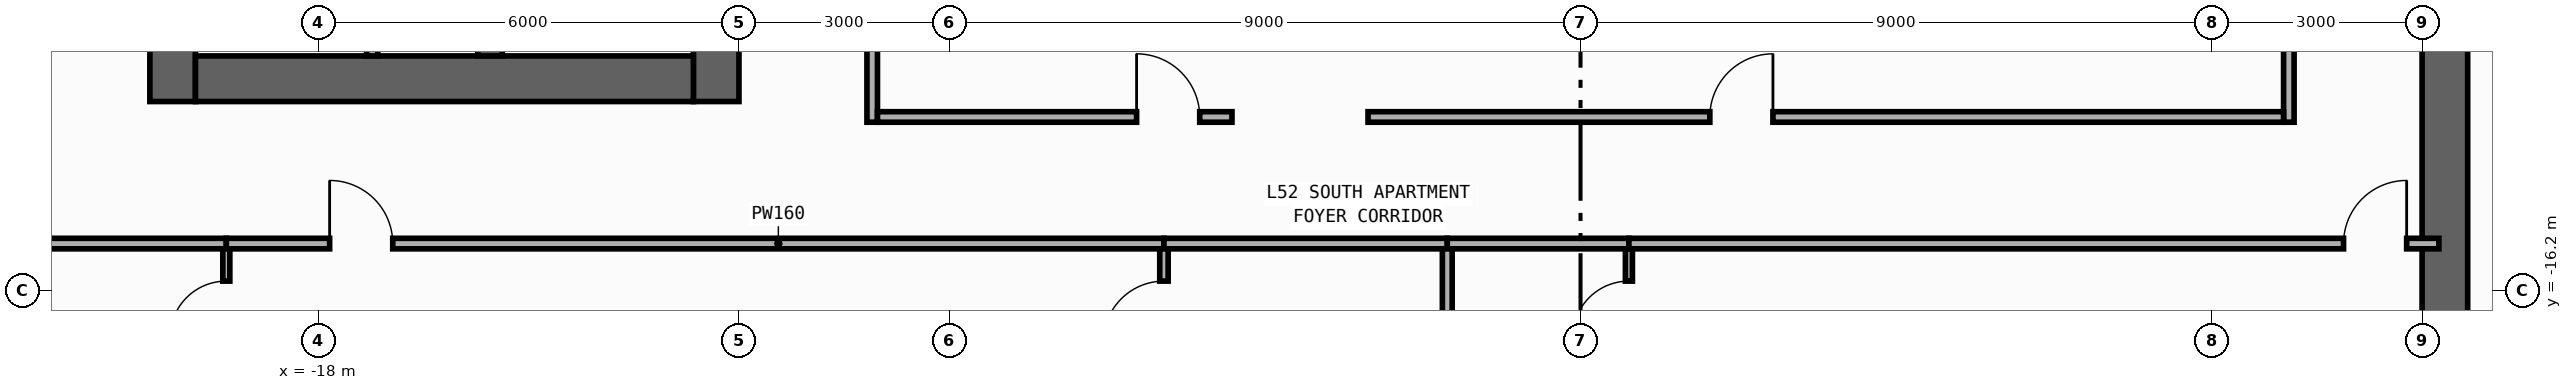
"""IFC4 building model, lengths in metres.
Left out: names, types, materials, properties, quantities, classifications, styles, units other than length and angle.
Written with IfcOpenShell. Run it as: python <this file> out.ifc"""

import sys

from ifc_helpers import new_model, si_unit, direction, frame, frame_2d, origin, place, context, subcontext, project, spatial, rectangle, extrude, element, fill, save


model = new_model("IFC4")
c1 = context("Model", 3, precision=1e-05, world=origin(), true_north=direction((0.0, 1.0)))
c2 = subcontext(c1, "Body", "Model", "MODEL_VIEW")
j1 = project(units=[si_unit("LENGTHUNIT", "METRE"), si_unit("PLANEANGLEUNIT", "RADIAN")], contexts=[c1])
p1 = place(None, origin())
s1 = spatial("IfcSite", under=j1, at=p1, CompositionType="ELEMENT")
p2 = place(p1, origin())
s2 = spatial("IfcBuilding", under=s1, at=p2, CompositionType="ELEMENT")
p3 = place(p2, frame((0.0, 0.0, 226.0)))
s3 = spatial("IfcBuildingStorey", under=s2, at=p3, CompositionType="ELEMENT", Elevation=226.0)
p4 = place(p3, frame((-20.075, -13.5, 0.0), z_axis=(0.0, 0.0, 1.0), x_axis=(0.0, 1.0, 0.0)))
e1 = element("IfcWall", 1, at=p4, inside=s3, PredefinedType="SHEAR", context=c2, shape_type="SweptSolid", body=[
    extrude(rectangle(XDim=27.0, YDim=0.65, at=frame_2d((13.5, 0.0))), origin(), (0.0, 0.0, 1.0), 3.34),
])
p5 = place(p3, frame((-12.325, -13.5, 0.0), z_axis=(0.0, 0.0, 1.0), x_axis=(0.0, 1.0, 0.0)))
e2 = element("IfcWall", 2, at=p5, inside=s3, PredefinedType="SHEAR", context=c2, shape_type="SweptSolid", body=[
    extrude(rectangle(XDim=27.0, YDim=0.65, at=frame_2d((13.5, 0.0))), origin(), (0.0, 0.0, 1.0), 3.34),
])
p6 = place(p5, frame((15.175, 0.0, 0.0)))
e3 = element("IfcOpeningElement", 3, at=p6, cuts=e2, PredefinedType="OPENING", context=c2, shape_type="SweptSolid", body=[
    extrude(rectangle(XDim=0.85, YDim=2.1, at=frame_2d((0.425, 1.05))), frame((0.0, 0.335, 0.0), z_axis=(0.0, -1.0, 0.0), x_axis=(1.0, 0.0, 0.0)), (0.0, 0.0, 1.0), 0.67),
])
p7 = place(p5, frame((21.275, 0.0, 0.0)))
e4 = element("IfcOpeningElement", 4, at=p7, cuts=e2, PredefinedType="OPENING", context=c2, shape_type="SweptSolid", body=[
    extrude(rectangle(XDim=0.85, YDim=2.1, at=frame_2d((0.425, 1.05))), frame((0.0, 0.335, 0.0), z_axis=(0.0, -1.0, 0.0), x_axis=(1.0, 0.0, 0.0)), (0.0, 0.0, 1.0), 0.67),
])
p8 = place(p5, frame((4.275, 0.0, 0.0)))
e5 = element("IfcOpeningElement", 5, at=p8, cuts=e2, PredefinedType="OPENING", context=c2, shape_type="SweptSolid", body=[
    extrude(rectangle(XDim=0.85, YDim=2.1, at=frame_2d((0.425, 1.05))), frame((0.0, 0.335, 0.0), z_axis=(0.0, -1.0, 0.0), x_axis=(1.0, 0.0, 0.0)), (0.0, 0.0, 1.0), 0.67),
])
p9 = place(p5, frame((10.275, 0.0, 0.0)))
e6 = element("IfcOpeningElement", 6, at=p9, cuts=e2, PredefinedType="OPENING", context=c2, shape_type="SweptSolid", body=[
    extrude(rectangle(XDim=0.85, YDim=2.1, at=frame_2d((0.425, 1.05))), frame((0.0, 0.335, 0.0), z_axis=(0.0, -1.0, 0.0), x_axis=(1.0, 0.0, 0.0)), (0.0, 0.0, 1.0), 0.67),
])
p10 = place(p5, frame((12.725, 0.0, 0.0)))
e7 = element("IfcOpeningElement", 7, at=p10, cuts=e2, PredefinedType="OPENING", context=c2, shape_type="SweptSolid", body=[
    extrude(rectangle(XDim=1.15, YDim=2.2, at=frame_2d((0.575, 1.1))), frame((0.0, 0.335, 0.0), z_axis=(0.0, -1.0, 0.0), x_axis=(1.0, 0.0, 0.0)), (0.0, 0.0, 1.0), 0.67),
])
p11 = place(p5, frame((1.625, 0.0, 0.0)))
e8 = element("IfcOpeningElement", 8, at=p11, cuts=e2, PredefinedType="OPENING", context=c2, shape_type="SweptSolid", body=[
    extrude(rectangle(XDim=0.85, YDim=2.1, at=frame_2d((0.425, 1.05))), frame((0.0, 0.335, 0.0), z_axis=(0.0, -1.0, 0.0), x_axis=(1.0, 0.0, 0.0)), (0.0, 0.0, 1.0), 0.67),
])
p12 = place(p3, frame((-19.75, -13.175, 0.0), z_axis=(0.0, 0.0, 1.0), x_axis=(1.0, 0.0, 0.0)))
e9 = element("IfcWall", 9, at=p12, inside=s3, PredefinedType="SHEAR", context=c2, shape_type="SweptSolid", body=[
    extrude(rectangle(XDim=7.1, YDim=0.65, at=frame_2d((3.55, 0.0))), origin(), (0.0, 0.0, 1.0), 3.34),
])
p13 = place(p3, frame((-15.55, -12.85, 0.0), z_axis=(0.0, 0.0, 1.0), x_axis=(0.0, 1.0, 0.0)))
e10 = element("IfcWall", 10, at=p13, inside=s3, PredefinedType="SHEAR", context=c2, shape_type="SweptSolid", body=[
    extrude(rectangle(XDim=25.7, YDim=0.35, at=frame_2d((12.85, 0.0))), origin(), (0.0, 0.0, 1.0), 3.34),
])
p14 = place(p13, frame((12.075, 0.0, 0.0)))
e11 = element("IfcOpeningElement", 11, at=p14, cuts=e10, PredefinedType="OPENING", context=c2, shape_type="SweptSolid", body=[
    extrude(rectangle(XDim=1.15, YDim=2.2, at=frame_2d((0.575, 1.1))), frame((0.0, 0.185, 0.0), z_axis=(0.0, -1.0, 0.0), x_axis=(1.0, 0.0, 0.0)), (0.0, 0.0, 1.0), 0.37),
])
p15 = place(p13, frame((0.975, 0.0, 0.0)))
e12 = element("IfcOpeningElement", 12, at=p15, cuts=e10, PredefinedType="OPENING", context=c2, shape_type="SweptSolid", body=[
    extrude(rectangle(XDim=0.85, YDim=2.1, at=frame_2d((0.425, 1.05))), frame((0.0, 0.185, 0.0), z_axis=(0.0, -1.0, 0.0), x_axis=(1.0, 0.0, 0.0)), (0.0, 0.0, 1.0), 0.37),
])
p16 = place(p3, frame((12.325, -19.8, 0.0), z_axis=(0.0, 0.0, 1.0), x_axis=(0.0, 1.0, 0.0)))
e13 = element("IfcWall", 13, at=p16, inside=s3, PredefinedType="SHEAR", context=c2, shape_type="SweptSolid", body=[
    extrude(rectangle(XDim=27.0, YDim=0.65, at=frame_2d((13.5, 0.0))), origin(), (0.0, 0.0, 1.0), 3.34),
])
p17 = place(p16, frame((23.05, 0.0, 0.0)))
e14 = element("IfcOpeningElement", 14, at=p17, cuts=e13, PredefinedType="OPENING", context=c2, shape_type="SweptSolid", body=[
    extrude(rectangle(XDim=1.1, YDim=2.2, at=frame_2d((0.55, 1.1))), frame((0.0, 0.335, 0.0), z_axis=(0.0, -1.0, 0.0), x_axis=(1.0, 0.0, 0.0)), (0.0, 0.0, 1.0), 0.67),
])
p18 = place(p16, frame((19.85, 0.0, 0.0)))
e15 = element("IfcOpeningElement", 15, at=p18, cuts=e13, PredefinedType="OPENING", context=c2, shape_type="SweptSolid", body=[
    extrude(rectangle(XDim=1.1, YDim=2.2, at=frame_2d((0.55, 1.1))), frame((0.0, 0.335, 0.0), z_axis=(0.0, -1.0, 0.0), x_axis=(1.0, 0.0, 0.0)), (0.0, 0.0, 1.0), 0.67),
])
p19 = place(p16, frame((16.65, 0.0, 0.0)))
e16 = element("IfcOpeningElement", 16, at=p19, cuts=e13, PredefinedType="OPENING", context=c2, shape_type="SweptSolid", body=[
    extrude(rectangle(XDim=1.1, YDim=2.2, at=frame_2d((0.55, 1.1))), frame((0.0, 0.335, 0.0), z_axis=(0.0, -1.0, 0.0), x_axis=(1.0, 0.0, 0.0)), (0.0, 0.0, 1.0), 0.67),
])
p20 = place(p16, frame((7.175, 0.0, 0.0)))
e17 = element("IfcOpeningElement", 17, at=p20, cuts=e13, PredefinedType="OPENING", context=c2, shape_type="SweptSolid", body=[
    extrude(rectangle(XDim=0.85, YDim=2.1, at=frame_2d((0.425, 1.05))), frame((0.0, 0.335, 0.0), z_axis=(0.0, -1.0, 0.0), x_axis=(1.0, 0.0, 0.0)), (0.0, 0.0, 1.0), 0.67),
])
p21 = place(p16, frame((10.375, 0.0, 0.0)))
e18 = element("IfcOpeningElement", 18, at=p21, cuts=e13, PredefinedType="OPENING", context=c2, shape_type="SweptSolid", body=[
    extrude(rectangle(XDim=0.85, YDim=2.1, at=frame_2d((0.425, 1.05))), frame((0.0, 0.335, 0.0), z_axis=(0.0, -1.0, 0.0), x_axis=(1.0, 0.0, 0.0)), (0.0, 0.0, 1.0), 0.67),
])
p22 = place(p16, frame((12.725, 0.0, 0.0)))
e19 = element("IfcOpeningElement", 19, at=p22, cuts=e13, PredefinedType="OPENING", context=c2, shape_type="SweptSolid", body=[
    extrude(rectangle(XDim=1.15, YDim=2.2, at=frame_2d((0.575, 1.1))), frame((0.0, 0.335, 0.0), z_axis=(0.0, -1.0, 0.0), x_axis=(1.0, 0.0, 0.0)), (0.0, 0.0, 1.0), 0.67),
])
p23 = place(p16, frame((25.125, 0.0, 0.0)))
e20 = element("IfcOpeningElement", 20, at=p23, cuts=e13, PredefinedType="OPENING", context=c2, shape_type="SweptSolid", body=[
    extrude(rectangle(XDim=0.85, YDim=2.1, at=frame_2d((0.425, 1.05))), frame((0.0, 0.335, 0.0), z_axis=(0.0, -1.0, 0.0), x_axis=(1.0, 0.0, 0.0)), (0.0, 0.0, 1.0), 0.67),
])
p24 = place(p3, frame((-17.23, -12.85, 0.0), z_axis=(0.0, 0.0, 1.0), x_axis=(0.0, 1.0, 0.0)))
e21 = element("IfcWall", 21, at=p24, inside=s3, PredefinedType="PARTITIONING", context=c2, shape_type="SweptSolid", body=[
    extrude(rectangle(XDim=2.38, YDim=0.16, at=frame_2d((1.19, 0.0))), origin(), (0.0, 0.0, 1.0), 3.34),
])
p25 = place(p24, frame((0.46, 0.0, 0.0)))
e22 = element("IfcOpeningElement", 22, at=p25, cuts=e21, PredefinedType="OPENING", context=c2, shape_type="SweptSolid", body=[
    extrude(rectangle(XDim=0.85, YDim=2.1, at=frame_2d((0.425, 1.05))), frame((0.0, 0.09, 0.0), z_axis=(0.0, -1.0, 0.0), x_axis=(1.0, 0.0, 0.0)), (0.0, 0.0, 1.0), 0.18),
])
p26 = place(p3, frame((-10.1, -13.795, 0.0), z_axis=(0.0, 0.0, 1.0), x_axis=(0.0, 1.0, 0.0)))
e23 = element("IfcWall", 23, at=p26, inside=s3, PredefinedType="PARTITIONING", context=c2, shape_type="SweptSolid", body=[
    extrude(rectangle(XDim=9.005, YDim=0.15, at=frame_2d((4.502, 0.0))), origin(), (0.0, 0.0, 1.0), 3.34),
])
p27 = place(p26, frame((7.645, 0.0, 0.0)))
e24 = element("IfcOpeningElement", 24, at=p27, cuts=e23, PredefinedType="OPENING", context=c2, shape_type="SweptSolid", body=[
    extrude(rectangle(XDim=0.9, YDim=2.15, at=frame_2d((0.45, 1.075))), frame((0.0, 0.085, 0.0), z_axis=(0.0, -1.0, 0.0), x_axis=(1.0, 0.0, 0.0)), (0.0, 0.0, 1.0), 0.17),
])
p28 = place(p3, frame((10.1, -13.795, 0.0), z_axis=(0.0, 0.0, 1.0), x_axis=(0.0, 1.0, 0.0)))
e25 = element("IfcWall", 25, at=p28, inside=s3, PredefinedType="PARTITIONING", context=c2, shape_type="SweptSolid", body=[
    extrude(rectangle(XDim=6.375, YDim=0.15, at=frame_2d((3.188, 0.0))), origin(), (0.0, 0.0, 1.0), 3.34),
])
p29 = place(p28, frame((5.015, 0.0, 0.0)))
e26 = element("IfcOpeningElement", 26, at=p29, cuts=e25, PredefinedType="OPENING", context=c2, shape_type="SweptSolid", body=[
    extrude(rectangle(XDim=0.9, YDim=2.15, at=frame_2d((0.45, 1.075))), frame((0.0, 0.085, 0.0), z_axis=(0.0, -1.0, 0.0), x_axis=(1.0, 0.0, 0.0)), (0.0, 0.0, 1.0), 0.17),
])
p30 = place(p3, frame((-21.955, -15.525, 0.0), z_axis=(0.0, 0.0, 1.0), x_axis=(1.0, 0.0, 0.0)))
e27 = element("IfcWall", 27, at=p30, inside=s3, PredefinedType="PARTITIONING", context=c2, shape_type="SweptSolid", body=[
    extrude(rectangle(XDim=2.645, YDim=0.15, at=frame_2d((1.323, 0.0))), origin(), (0.0, 0.0, 1.0), 3.34),
])
p31 = place(p3, frame((-19.31, -15.525, 0.0), z_axis=(0.0, 0.0, 1.0), x_axis=(1.0, 0.0, 0.0)))
e28 = element("IfcWall", 28, at=p31, inside=s3, PredefinedType="PARTITIONING", context=c2, shape_type="SweptSolid", body=[
    extrude(rectangle(XDim=13.37, YDim=0.15, at=frame_2d((6.685, 0.0))), origin(), (0.0, 0.0, 1.0), 3.34),
])
p32 = place(p31, frame((1.473, 0.0, 0.0)))
e29 = element("IfcOpeningElement", 29, at=p32, cuts=e28, PredefinedType="OPENING", context=c2, shape_type="SweptSolid", body=[
    extrude(rectangle(XDim=0.9, YDim=2.15, at=frame_2d((0.45, 1.075))), frame((0.0, 0.085, 0.0), z_axis=(0.0, -1.0, 0.0), x_axis=(1.0, 0.0, 0.0)), (0.0, 0.0, 1.0), 0.17),
])
p33 = place(p3, frame((-5.94, -15.525, 0.0), z_axis=(0.0, 0.0, 1.0), x_axis=(1.0, 0.0, 0.0)))
e30 = element("IfcWall", 30, at=p33, inside=s3, PredefinedType="PARTITIONING", context=c2, shape_type="SweptSolid", body=[
    extrude(rectangle(XDim=4.04, YDim=0.15, at=frame_2d((2.02, 0.0))), origin(), (0.0, 0.0, 1.0), 3.34),
])
p34 = place(p3, frame((-1.9, -15.525, 0.0), z_axis=(0.0, 0.0, 1.0), x_axis=(1.0, 0.0, 0.0)))
e31 = element("IfcWall", 31, at=p34, inside=s3, PredefinedType="PARTITIONING", context=c2, shape_type="SweptSolid", body=[
    extrude(rectangle(XDim=2.59, YDim=0.15, at=frame_2d((1.295, 0.0))), origin(), (0.0, 0.0, 1.0), 3.34),
])
p35 = place(p3, frame((0.69, -15.525, 0.0), z_axis=(0.0, 0.0, 1.0), x_axis=(1.0, 0.0, 0.0)))
e32 = element("IfcWall", 32, at=p35, inside=s3, PredefinedType="PARTITIONING", context=c2, shape_type="SweptSolid", body=[
    extrude(rectangle(XDim=11.55, YDim=0.15, at=frame_2d((5.775, 0.0))), origin(), (0.0, 0.0, 1.0), 3.34),
])
p36 = place(p35, frame((10.19, 0.0, 0.0)))
e33 = element("IfcOpeningElement", 33, at=p36, cuts=e32, PredefinedType="OPENING", context=c2, shape_type="SweptSolid", body=[
    extrude(rectangle(XDim=0.9, YDim=2.15, at=frame_2d((0.45, 1.075))), frame((0.0, 0.085, 0.0), z_axis=(0.0, -1.0, 0.0), x_axis=(1.0, 0.0, 0.0)), (0.0, 0.0, 1.0), 0.17),
])
p37 = place(p3, frame((-10.025, -13.72, 0.0), z_axis=(0.0, 0.0, 1.0), x_axis=(1.0, 0.0, 0.0)))
e34 = element("IfcWall", 34, at=p37, inside=s3, PredefinedType="PARTITIONING", context=c2, shape_type="SweptSolid", body=[
    extrude(rectangle(XDim=5.055, YDim=0.15, at=frame_2d((2.527, 0.0))), origin(), (0.0, 0.0, 1.0), 3.34),
])
p38 = place(p37, frame((3.695, 0.0, 0.0)))
e35 = element("IfcOpeningElement", 35, at=p38, cuts=e34, PredefinedType="OPENING", context=c2, shape_type="SweptSolid", body=[
    extrude(rectangle(XDim=0.9, YDim=2.15, at=frame_2d((0.45, 1.075))), frame((0.0, 0.085, 0.0), z_axis=(0.0, -1.0, 0.0), x_axis=(1.0, 0.0, 0.0)), (0.0, 0.0, 1.0), 0.17),
])
p39 = place(p3, frame((-3.03, -13.72, 0.0), z_axis=(0.0, 0.0, 1.0), x_axis=(1.0, 0.0, 0.0)))
e36 = element("IfcWall", 36, at=p39, inside=s3, PredefinedType="PARTITIONING", context=c2, shape_type="SweptSolid", body=[
    extrude(rectangle(XDim=13.055, YDim=0.15, at=frame_2d((6.527, 0.0))), origin(), (0.0, 0.0, 1.0), 3.34),
])
p40 = place(p39, frame((4.874, 0.0, 0.0)))
e37 = element("IfcOpeningElement", 37, at=p40, cuts=e36, PredefinedType="OPENING", context=c2, shape_type="SweptSolid", body=[
    extrude(rectangle(XDim=0.9, YDim=2.15, at=frame_2d((0.45, 1.075))), frame((0.0, 0.085, 0.0), z_axis=(0.0, -1.0, 0.0), x_axis=(1.0, 0.0, 0.0)), (0.0, 0.0, 1.0), 0.17),
])
p41 = place(p3, frame((-19.31, -18.1, 0.0), z_axis=(0.0, 0.0, 1.0), x_axis=(0.0, 1.0, 0.0)))
e38 = element("IfcWall", 38, at=p41, inside=s3, PredefinedType="PARTITIONING", context=c2, shape_type="SweptSolid", body=[
    extrude(rectangle(XDim=2.5, YDim=0.1, at=frame_2d((1.25, 0.0))), origin(), (0.0, 0.0, 1.0), 3.34),
])
p42 = place(p41, frame((1.24, 0.0, 0.0)))
e39 = element("IfcOpeningElement", 39, at=p42, cuts=e38, PredefinedType="OPENING", context=c2, shape_type="SweptSolid", body=[
    extrude(rectangle(XDim=0.8, YDim=2.1, at=frame_2d((0.4, 1.05))), frame((0.0, 0.06, 0.0), z_axis=(0.0, -1.0, 0.0), x_axis=(1.0, 0.0, 0.0)), (0.0, 0.0, 1.0), 0.12),
])
p43 = place(p3, frame((-5.94, -20.1, 0.0), z_axis=(0.0, 0.0, 1.0), x_axis=(0.0, 1.0, 0.0)))
e40 = element("IfcWall", 40, at=p43, inside=s3, PredefinedType="PARTITIONING", context=c2, shape_type="SweptSolid", body=[
    extrude(rectangle(XDim=4.5, YDim=0.12, at=frame_2d((2.25, 0.0))), origin(), (0.0, 0.0, 1.0), 3.34),
])
p44 = place(p43, frame((3.18, 0.0, 0.0)))
e41 = element("IfcOpeningElement", 41, at=p44, cuts=e40, PredefinedType="OPENING", context=c2, shape_type="SweptSolid", body=[
    extrude(rectangle(XDim=0.86, YDim=2.15, at=frame_2d((0.43, 1.075))), frame((0.0, 0.07, 0.0), z_axis=(0.0, -1.0, 0.0), x_axis=(1.0, 0.0, 0.0)), (0.0, 0.0, 1.0), 0.14),
])
p45 = place(p3, frame((-1.9, -18.1, 0.0), z_axis=(0.0, 0.0, 1.0), x_axis=(0.0, 1.0, 0.0)))
e42 = element("IfcWall", 42, at=p45, inside=s3, PredefinedType="PARTITIONING", context=c2, shape_type="SweptSolid", body=[
    extrude(rectangle(XDim=2.5, YDim=0.14, at=frame_2d((1.25, 0.0))), origin(), (0.0, 0.0, 1.0), 3.34),
])
p46 = place(p3, frame((0.69, -18.1, 0.0), z_axis=(0.0, 0.0, 1.0), x_axis=(0.0, 1.0, 0.0)))
e43 = element("IfcWall", 43, at=p46, inside=s3, PredefinedType="PARTITIONING", context=c2, shape_type="SweptSolid", body=[
    extrude(rectangle(XDim=2.5, YDim=0.1, at=frame_2d((1.25, 0.0))), origin(), (0.0, 0.0, 1.0), 3.34),
])
p47 = place(p46, frame((1.24, 0.0, 0.0)))
e44 = element("IfcOpeningElement", 44, at=p47, cuts=e43, PredefinedType="OPENING", context=c2, shape_type="SweptSolid", body=[
    extrude(rectangle(XDim=0.8, YDim=2.1, at=frame_2d((0.4, 1.05))), frame((0.0, 0.06, 0.0), z_axis=(0.0, -1.0, 0.0), x_axis=(1.0, 0.0, 0.0)), (0.0, 0.0, 1.0), 0.12),
])
p48 = place(p32, origin())
e45 = element("IfcDoor", 45, at=p48, inside=s3, OperationType="SINGLE_SWING_LEFT", PredefinedType="DOOR", context=c2, shape_type="SweptSolid", body=[
    extrude(rectangle(XDim=0.9, YDim=2.15, at=frame_2d((0.45, 1.075))), frame((0.0, 0.025, 0.0), z_axis=(0.0, -1.0, 0.0), x_axis=(1.0, 0.0, 0.0)), (0.0, 0.0, 1.0), 0.05),
])
fill(e29, e45)
p49 = place(p36, origin())
e46 = element("IfcDoor", 46, at=p49, inside=s3, OperationType="SINGLE_SWING_RIGHT", PredefinedType="DOOR", context=c2, shape_type="SweptSolid", body=[
    extrude(rectangle(XDim=0.9, YDim=2.15, at=frame_2d((0.45, 1.075))), frame((0.0, 0.025, 0.0), z_axis=(0.0, -1.0, 0.0), x_axis=(1.0, 0.0, 0.0)), (0.0, 0.0, 1.0), 0.05),
])
fill(e33, e46)
p50 = place(p38, origin())
e47 = element("IfcDoor", 47, at=p50, inside=s3, OperationType="SINGLE_SWING_LEFT", PredefinedType="DOOR", context=c2, shape_type="SweptSolid", body=[
    extrude(rectangle(XDim=0.9, YDim=2.15, at=frame_2d((0.45, 1.075))), frame((0.0, 0.025, 0.0), z_axis=(0.0, -1.0, 0.0), x_axis=(1.0, 0.0, 0.0)), (0.0, 0.0, 1.0), 0.05),
])
fill(e35, e47)
p51 = place(p40, origin())
e48 = element("IfcDoor", 48, at=p51, inside=s3, OperationType="SINGLE_SWING_RIGHT", PredefinedType="DOOR", context=c2, shape_type="SweptSolid", body=[
    extrude(rectangle(XDim=0.9, YDim=2.15, at=frame_2d((0.45, 1.075))), frame((0.0, 0.025, 0.0), z_axis=(0.0, -1.0, 0.0), x_axis=(1.0, 0.0, 0.0)), (0.0, 0.0, 1.0), 0.05),
])
fill(e37, e48)
p52 = place(p42, origin())
e49 = element("IfcDoor", 49, at=p52, inside=s3, OperationType="SINGLE_SWING_LEFT", PredefinedType="DOOR", context=c2, shape_type="SweptSolid", body=[
    extrude(rectangle(XDim=0.8, YDim=2.1, at=frame_2d((0.4, 1.05))), frame((0.0, 0.025, 0.0), z_axis=(0.0, -1.0, 0.0), x_axis=(1.0, 0.0, 0.0)), (0.0, 0.0, 1.0), 0.05),
])
fill(e39, e49)
p53 = place(p44, origin())
e50 = element("IfcDoor", 50, at=p53, inside=s3, OperationType="SINGLE_SWING_LEFT", PredefinedType="DOOR", context=c2, shape_type="SweptSolid", body=[
    extrude(rectangle(XDim=0.86, YDim=2.15, at=frame_2d((0.43, 1.075))), frame((0.0, 0.025, 0.0), z_axis=(0.0, -1.0, 0.0), x_axis=(1.0, 0.0, 0.0)), (0.0, 0.0, 1.0), 0.05),
])
fill(e41, e50)
p54 = place(p47, origin())
e51 = element("IfcDoor", 51, at=p54, inside=s3, OperationType="SINGLE_SWING_LEFT", PredefinedType="DOOR", context=c2, shape_type="SweptSolid", body=[
    extrude(rectangle(XDim=0.8, YDim=2.1, at=frame_2d((0.4, 1.05))), frame((0.0, 0.025, 0.0), z_axis=(0.0, -1.0, 0.0), x_axis=(1.0, 0.0, 0.0)), (0.0, 0.0, 1.0), 0.05),
])
fill(e44, e51)
save(model, sys.argv[1])
